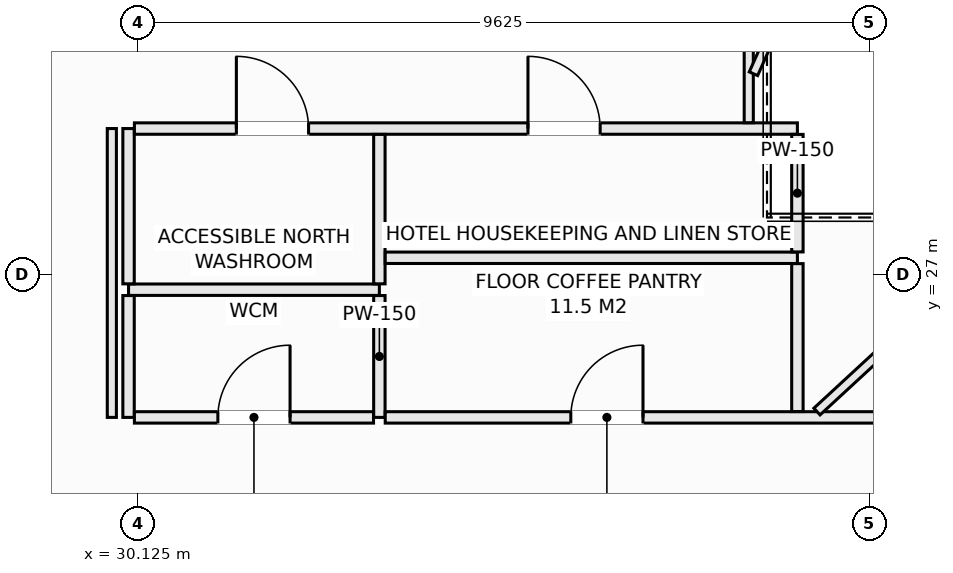
"""IFC4 building model, lengths in metres.
Left out: names, types, materials, properties, quantities, classifications, styles, units other than length and angle.
Written with IfcOpenShell. Run it as: python <this file> out.ifc"""

import sys

from ifc_helpers import new_model, si_unit, direction, frame, frame_2d, origin, place, context, subcontext, project, spatial, rectangle, extrude, element, fill, save


model = new_model("IFC4")
c1 = context("Model", 3, precision=1e-05, world=origin(), true_north=direction((0.0, 1.0)))
c2 = subcontext(c1, "Body", "Model", "MODEL_VIEW")
j1 = project(units=[si_unit("LENGTHUNIT", "METRE"), si_unit("PLANEANGLEUNIT", "RADIAN")], contexts=[c1])
p1 = place(None, origin())
s1 = spatial("IfcSite", under=j1, at=p1, CompositionType="ELEMENT")
p2 = place(p1, origin())
s2 = spatial("IfcBuilding", under=s1, at=p2, CompositionType="ELEMENT")
p3 = place(p2, frame((0.0, 0.0, 112.1)))
s3 = spatial("IfcBuildingStorey", under=s2, at=p3, CompositionType="ELEMENT", Elevation=112.1)
p4 = place(p3, frame((30.0, 26.8, 0.0), z_axis=(0.0, 0.0, 1.0), x_axis=(1.0, 0.0, 0.0)))
e1 = element("IfcWall", 1, at=p4, inside=s3, PredefinedType="PARTITIONING", context=c2, shape_type="SweptSolid", body=[
    extrude(rectangle(XDim=3.3, YDim=0.15, at=frame_2d((1.65, 0.0))), origin(), (0.0, 0.0, 1.0), 3.13),
])
p5 = place(p3, frame((30.0, 25.12, 0.0), z_axis=(0.0, 0.0, 1.0), x_axis=(0.0, 1.0, 0.0)))
e2 = element("IfcWall", 2, at=p5, inside=s3, PredefinedType="PARTITIONING", context=c2, shape_type="SweptSolid", body=[
    extrude(rectangle(XDim=1.603, YDim=0.15, at=frame_2d((0.801, 0.0))), origin(), (0.0, 0.0, 1.0), 3.13),
])
p6 = place(p3, frame((30.0, 26.877, 0.0), z_axis=(0.0, 0.0, 1.0), x_axis=(0.0, 1.0, 0.0)))
e3 = element("IfcWall", 3, at=p6, inside=s3, PredefinedType="PARTITIONING", context=c2, shape_type="SweptSolid", body=[
    extrude(rectangle(XDim=2.043, YDim=0.15, at=frame_2d((1.021, 0.0))), origin(), (0.0, 0.0, 1.0), 3.13),
])
p7 = place(p3, frame((30.077, 28.92, 0.0), z_axis=(0.0, 0.0, 1.0), x_axis=(1.0, 0.0, 0.0)))
e4 = element("IfcWall", 4, at=p7, inside=s3, PredefinedType="PARTITIONING", context=c2, shape_type="SweptSolid", body=[
    extrude(rectangle(XDim=8.723, YDim=0.15, at=frame_2d((4.362, 0.0))), origin(), (0.0, 0.0, 1.0), 3.13),
])
p8 = place(p7, frame((1.342, 0.0, 0.0)))
e5 = element("IfcOpeningElement", 5, at=p8, cuts=e4, PredefinedType="OPENING", context=c2, shape_type="SweptSolid", body=[
    extrude(rectangle(XDim=0.95, YDim=2.1, at=frame_2d((0.475, 1.05))), frame((0.0, 0.085, 0.0), z_axis=(0.0, -1.0, 0.0), x_axis=(1.0, 0.0, 0.0)), (0.0, 0.0, 1.0), 0.17),
])
p9 = place(p7, frame((5.178, 0.0, 0.0)))
e6 = element("IfcOpeningElement", 6, at=p9, cuts=e4, PredefinedType="OPENING", context=c2, shape_type="SweptSolid", body=[
    extrude(rectangle(XDim=0.95, YDim=2.1, at=frame_2d((0.475, 1.05))), frame((0.0, 0.085, 0.0), z_axis=(0.0, -1.0, 0.0), x_axis=(1.0, 0.0, 0.0)), (0.0, 0.0, 1.0), 0.17),
])
p10 = place(p3, frame((33.3, 25.12, 0.0), z_axis=(0.0, 0.0, 1.0), x_axis=(0.0, 1.0, 0.0)))
e7 = element("IfcWall", 7, at=p10, inside=s3, PredefinedType="PARTITIONING", context=c2, shape_type="SweptSolid", body=[
    extrude(rectangle(XDim=1.603, YDim=0.15, at=frame_2d((0.801, 0.0))), origin(), (0.0, 0.0, 1.0), 3.13),
])
p11 = place(p3, frame((33.3, 26.877, 0.0), z_axis=(0.0, 0.0, 1.0), x_axis=(0.0, 1.0, 0.0)))
e8 = element("IfcWall", 8, at=p11, inside=s3, PredefinedType="PARTITIONING", context=c2, shape_type="SweptSolid", body=[
    extrude(rectangle(XDim=1.966, YDim=0.15, at=frame_2d((0.983, 0.0))), origin(), (0.0, 0.0, 1.0), 3.13),
])
p12 = place(p3, frame((30.077, 25.12, 0.0), z_axis=(0.0, 0.0, 1.0), x_axis=(1.0, 0.0, 0.0)))
e9 = element("IfcWall", 9, at=p12, inside=s3, PredefinedType="PARTITIONING", context=c2, shape_type="SweptSolid", body=[
    extrude(rectangle(XDim=3.146, YDim=0.15, at=frame_2d((1.573, 0.0))), origin(), (0.0, 0.0, 1.0), 3.13),
])
p13 = place(p12, frame((1.098, 0.0, 0.0)))
e10 = element("IfcOpeningElement", 10, at=p13, cuts=e9, PredefinedType="OPENING", context=c2, shape_type="SweptSolid", body=[
    extrude(rectangle(XDim=0.95, YDim=2.1, at=frame_2d((0.475, 1.05))), frame((0.0, 0.085, 0.0), z_axis=(0.0, -1.0, 0.0), x_axis=(1.0, 0.0, 0.0)), (0.0, 0.0, 1.0), 0.17),
])
p14 = place(p3, frame((33.377, 25.12, 0.0), z_axis=(0.0, 0.0, 1.0), x_axis=(1.0, 0.0, 0.0)))
e11 = element("IfcWall", 11, at=p14, inside=s3, PredefinedType="PARTITIONING", context=c2, shape_type="SweptSolid", body=[
    extrude(rectangle(XDim=10.373, YDim=0.15, at=frame_2d((5.187, 0.0))), origin(), (0.0, 0.0, 1.0), 3.13),
])
p15 = place(p14, frame((2.441, 0.0, 0.0)))
e12 = element("IfcOpeningElement", 12, at=p15, cuts=e11, PredefinedType="OPENING", context=c2, shape_type="SweptSolid", body=[
    extrude(rectangle(XDim=0.95, YDim=2.1, at=frame_2d((0.475, 1.05))), frame((0.0, 0.085, 0.0), z_axis=(0.0, -1.0, 0.0), x_axis=(1.0, 0.0, 0.0)), (0.0, 0.0, 1.0), 0.17),
])
p16 = place(p14, frame((7.248, 0.0, 0.0)))
e13 = element("IfcOpeningElement", 13, at=p16, cuts=e11, PredefinedType="OPENING", context=c2, shape_type="SweptSolid", body=[
    extrude(rectangle(XDim=0.95, YDim=2.1, at=frame_2d((0.475, 1.05))), frame((0.0, 0.085, 0.0), z_axis=(0.0, -1.0, 0.0), x_axis=(1.0, 0.0, 0.0)), (0.0, 0.0, 1.0), 0.17),
])
p17 = place(p3, frame((33.377, 27.22, 0.0), z_axis=(0.0, 0.0, 1.0), x_axis=(1.0, 0.0, 0.0)))
e14 = element("IfcWall", 14, at=p17, inside=s3, PredefinedType="PARTITIONING", context=c2, shape_type="SweptSolid", body=[
    extrude(rectangle(XDim=5.423, YDim=0.15, at=frame_2d((2.711, 0.0))), origin(), (0.0, 0.0, 1.0), 3.13),
])
p18 = place(p3, frame((38.8, 25.197, 0.0), z_axis=(0.0, 0.0, 1.0), x_axis=(0.0, 1.0, 0.0)))
e15 = element("IfcWall", 15, at=p18, inside=s3, PredefinedType="PARTITIONING", context=c2, shape_type="SweptSolid", body=[
    extrude(rectangle(XDim=1.946, YDim=0.15, at=frame_2d((0.973, 0.0))), origin(), (0.0, 0.0, 1.0), 3.13),
])
p19 = place(p3, frame((38.8, 27.297, 0.0), z_axis=(0.0, 0.0, 1.0), x_axis=(0.0, 1.0, 0.0)))
e16 = element("IfcWall", 16, at=p19, inside=s3, PredefinedType="PARTITIONING", context=c2, shape_type="SweptSolid", body=[
    extrude(rectangle(XDim=1.546, YDim=0.15, at=frame_2d((0.773, 0.0))), origin(), (0.0, 0.0, 1.0), 3.13),
])
p20 = place(p3, frame((29.78, 25.12, 0.0), z_axis=(0.0, 0.0, 1.0), x_axis=(0.0, 1.0, 0.0)))
e17 = element("IfcWall", 17, at=p20, inside=s3, PredefinedType="PARTITIONING", context=c2, shape_type="SweptSolid", body=[
    extrude(rectangle(XDim=3.8, YDim=0.12, at=frame_2d((1.9, 0.0))), origin(), (0.0, 0.0, 1.0), 3.13),
])
p21 = place(p3, frame((38.16, 28.997, 0.0), z_axis=(0.0, 0.0, 1.0), x_axis=(0.0, 1.0, 0.0)))
e18 = element("IfcWall", 18, at=p21, inside=s3, PredefinedType="PARTITIONING", context=c2, shape_type="SweptSolid", body=[
    extrude(rectangle(XDim=2.031, YDim=0.12, at=frame_2d((1.016, 0.0))), origin(), (0.0, 0.0, 1.0), 3.13),
])
p22 = place(p3, frame((39.058, 25.197, 0.0), z_axis=(0.0, 0.0, 1.0), x_axis=(0.73497871786, 0.67809017416, 0.0)))
e19 = element("IfcWall", 19, at=p22, inside=s3, PredefinedType="PARTITIONING", context=c2, shape_type="SweptSolid", body=[
    extrude(rectangle(XDim=2.296, YDim=0.12, at=frame_2d((1.148, 0.0))), origin(), (0.0, 0.0, 1.0), 3.13),
])
p23 = place(p3, frame((38.222, 29.641, 0.0), z_axis=(0.0, 0.0, 1.0), x_axis=(0.406604168362, 0.913604427677, 0.0)))
e20 = element("IfcWall", 20, at=p23, inside=s3, PredefinedType="PARTITIONING", context=c2, shape_type="SweptSolid", body=[
    extrude(rectangle(XDim=0.438, YDim=0.12, at=frame_2d((0.219, 0.0))), origin(), (0.0, 0.0, 1.0), 3.13),
])
p24 = place(p8, origin())
e21 = element("IfcDoor", 21, at=p24, inside=s3, OperationType="SINGLE_SWING_LEFT", PredefinedType="DOOR", context=c2, shape_type="SweptSolid", body=[
    extrude(rectangle(XDim=0.95, YDim=2.1, at=frame_2d((0.475, 1.05))), frame((0.0, 0.025, 0.0), z_axis=(0.0, -1.0, 0.0), x_axis=(1.0, 0.0, 0.0)), (0.0, 0.0, 1.0), 0.05),
])
fill(e5, e21)
p25 = place(p13, origin())
e22 = element("IfcDoor", 22, at=p25, inside=s3, OperationType="SINGLE_SWING_RIGHT", PredefinedType="DOOR", context=c2, shape_type="SweptSolid", body=[
    extrude(rectangle(XDim=0.95, YDim=2.1, at=frame_2d((0.475, 1.05))), frame((0.0, 0.025, 0.0), z_axis=(0.0, -1.0, 0.0), x_axis=(1.0, 0.0, 0.0)), (0.0, 0.0, 1.0), 0.05),
])
fill(e10, e22)
p26 = place(p9, origin())
e23 = element("IfcDoor", 23, at=p26, inside=s3, OperationType="SINGLE_SWING_LEFT", PredefinedType="DOOR", context=c2, shape_type="SweptSolid", body=[
    extrude(rectangle(XDim=0.95, YDim=2.1, at=frame_2d((0.475, 1.05))), frame((0.0, 0.025, 0.0), z_axis=(0.0, -1.0, 0.0), x_axis=(1.0, 0.0, 0.0)), (0.0, 0.0, 1.0), 0.05),
])
fill(e6, e23)
p27 = place(p15, origin())
e24 = element("IfcDoor", 24, at=p27, inside=s3, OperationType="SINGLE_SWING_RIGHT", PredefinedType="DOOR", context=c2, shape_type="SweptSolid", body=[
    extrude(rectangle(XDim=0.95, YDim=2.1, at=frame_2d((0.475, 1.05))), frame((0.0, 0.025, 0.0), z_axis=(0.0, -1.0, 0.0), x_axis=(1.0, 0.0, 0.0)), (0.0, 0.0, 1.0), 0.05),
])
fill(e12, e24)
save(model, sys.argv[1])
